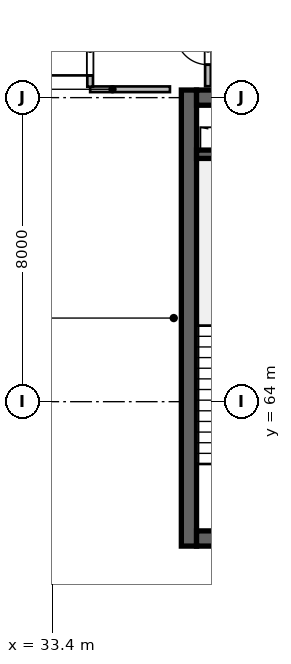
"""IFC4 building model, lengths in metres.
Left out: names, types, materials, properties, quantities, classifications, styles, units other than length and angle.
Written with IfcOpenShell. Run it as: python <this file> out.ifc"""

import sys

from ifc_helpers import new_model, si_unit, direction, frame, frame_2d, origin, place, context, subcontext, project, spatial, rectangle, extrude, source, transform, mapped, element, fill, save


model = new_model("IFC4")
c1 = context("Model", 3, precision=1e-05, world=origin(), true_north=direction((0.0, 1.0)))
c2 = subcontext(c1, "Body", "Model", "MODEL_VIEW")
j1 = project(units=[si_unit("LENGTHUNIT", "METRE"), si_unit("PLANEANGLEUNIT", "RADIAN")], contexts=[c1])
p1 = place(None, origin())
s1 = spatial("IfcSite", under=j1, at=p1, CompositionType="ELEMENT")
p2 = place(p1, origin())
s2 = spatial("IfcBuilding", under=s1, at=p2, CompositionType="ELEMENT")
p3 = place(p2, frame((0.0, 0.0, 303.0)))
s3 = spatial("IfcBuildingStorey", under=s2, at=p3, CompositionType="ELEMENT", Elevation=303.0)
m1 = source(origin(), c2, "Body", "SweptSolid", [
    extrude(rectangle(XDim=12.0, YDim=0.4, at=frame_2d((6.0, 0.0))), origin(), (0.0, 0.0, 1.0), 4.8),
])
p4 = place(p3, frame((37.0, 60.2, 0.0), z_axis=(0.0, 0.0, 1.0), x_axis=(0.0, 1.0, 0.0)))
e1 = element("IfcWall", 1, at=p4, inside=s3, PredefinedType="SHEAR", context=c2, shape_type="MappedRepresentation", body=[
    mapped(m1, transform((0.0, 0.0, 0.0), scale=1.0)),
])
m2 = source(origin(), c2, "Body", "SweptSolid", [
    extrude(rectangle(XDim=21.6, YDim=0.4, at=frame_2d((10.8, 0.0))), origin(), (0.0, 0.0, 1.0), 4.8),
])
p5 = place(p3, frame((37.2, 60.4, 0.0), z_axis=(0.0, 0.0, 1.0), x_axis=(1.0, 0.0, 0.0)))
e2 = element("IfcWall", 2, at=p5, inside=s3, PredefinedType="SHEAR", context=c2, shape_type="MappedRepresentation", body=[
    mapped(m2, transform((0.0, 0.0, 0.0), scale=1.0)),
])
p6 = place(p5, frame((1.1, 0.0, 0.0)))
e3 = element("IfcOpeningElement", 3, at=p6, cuts=e2, PredefinedType="OPENING", context=c2, shape_type="SweptSolid", body=[
    extrude(rectangle(XDim=1.15, YDim=2.15, at=frame_2d((0.575, 1.075))), frame((0.0, 0.21, 0.0), z_axis=(0.0, -1.0, 0.0), x_axis=(1.0, 0.0, 0.0)), (0.0, 0.0, 1.0), 0.42),
])
p7 = place(p5, frame((19.5, 0.0, 0.0)))
e4 = element("IfcOpeningElement", 4, at=p7, cuts=e2, PredefinedType="OPENING", context=c2, shape_type="SweptSolid", body=[
    extrude(rectangle(XDim=0.9, YDim=2.1, at=frame_2d((0.45, 1.05))), frame((0.0, 0.21, 0.0), z_axis=(0.0, -1.0, 0.0), x_axis=(1.0, 0.0, 0.0)), (0.0, 0.0, 1.0), 0.42),
])
p8 = place(p5, frame((12.02, 0.0, 0.0)))
e5 = element("IfcOpeningElement", 5, at=p8, cuts=e2, PredefinedType="OPENING", context=c2, shape_type="SweptSolid", body=[
    extrude(rectangle(XDim=1.6, YDim=2.15, at=frame_2d((0.8, 1.075))), frame((0.0, 0.21, 0.0), z_axis=(0.0, -1.0, 0.0), x_axis=(1.0, 0.0, 0.0)), (0.0, 0.0, 1.0), 0.42),
])
p9 = place(p3, frame((37.2, 72.0, 0.0), z_axis=(0.0, 0.0, 1.0), x_axis=(1.0, 0.0, 0.0)))
e6 = element("IfcWall", 6, at=p9, inside=s3, PredefinedType="SHEAR", context=c2, shape_type="MappedRepresentation", body=[
    mapped(m2, transform((0.0, 0.0, 0.0), scale=1.0)),
])
p10 = place(p9, frame((1.2, 0.0, 0.0)))
e7 = element("IfcOpeningElement", 7, at=p10, cuts=e6, PredefinedType="OPENING", context=c2, shape_type="SweptSolid", body=[
    extrude(rectangle(XDim=0.9, YDim=2.1, at=frame_2d((0.45, 1.05))), frame((0.0, 0.21, 0.0), z_axis=(0.0, -1.0, 0.0), x_axis=(1.0, 0.0, 0.0)), (0.0, 0.0, 1.0), 0.42),
])
p11 = place(p9, frame((14.7, 0.0, 0.0)))
e8 = element("IfcOpeningElement", 8, at=p11, cuts=e6, PredefinedType="OPENING", context=c2, shape_type="SweptSolid", body=[
    extrude(rectangle(XDim=1.2, YDim=2.15, at=frame_2d((0.6, 1.075))), frame((0.0, 0.21, 0.0), z_axis=(0.0, -1.0, 0.0), x_axis=(1.0, 0.0, 0.0)), (0.0, 0.0, 1.0), 0.42),
])
p12 = place(p9, frame((4.15, 0.0, 0.0)))
e9 = element("IfcOpeningElement", 9, at=p12, cuts=e6, PredefinedType="OPENING", context=c2, shape_type="SweptSolid", body=[
    extrude(rectangle(XDim=1.3, YDim=2.15, at=frame_2d((0.65, 1.075))), frame((0.0, 0.21, 0.0), z_axis=(0.0, -1.0, 0.0), x_axis=(1.0, 0.0, 0.0)), (0.0, 0.0, 1.0), 0.42),
])
p13 = place(p9, frame((6.76, 0.0, 0.0)))
e10 = element("IfcOpeningElement", 10, at=p13, cuts=e6, PredefinedType="OPENING", context=c2, shape_type="SweptSolid", body=[
    extrude(rectangle(XDim=0.85, YDim=2.1, at=frame_2d((0.425, 1.05))), frame((0.0, 0.21, 0.0), z_axis=(0.0, -1.0, 0.0), x_axis=(1.0, 0.0, 0.0)), (0.0, 0.0, 1.0), 0.42),
])
p14 = place(p9, frame((8.76, 0.0, 0.0)))
e11 = element("IfcOpeningElement", 11, at=p14, cuts=e6, PredefinedType="OPENING", context=c2, shape_type="SweptSolid", body=[
    extrude(rectangle(XDim=0.85, YDim=2.1, at=frame_2d((0.425, 1.05))), frame((0.0, 0.21, 0.0), z_axis=(0.0, -1.0, 0.0), x_axis=(1.0, 0.0, 0.0)), (0.0, 0.0, 1.0), 0.42),
])
p15 = place(p9, frame((10.725, 0.0, 0.0)))
e12 = element("IfcOpeningElement", 12, at=p15, cuts=e6, PredefinedType="OPENING", context=c2, shape_type="SweptSolid", body=[
    extrude(rectangle(XDim=0.85, YDim=2.1, at=frame_2d((0.425, 1.05))), frame((0.0, 0.21, 0.0), z_axis=(0.0, -1.0, 0.0), x_axis=(1.0, 0.0, 0.0)), (0.0, 0.0, 1.0), 0.42),
])
m3 = source(origin(), c2, "Body", "SweptSolid", [
    extrude(rectangle(XDim=3.27, YDim=0.22, at=frame_2d((1.635, 0.0))), origin(), (0.0, 0.0, 1.0), 4.8),
])
p16 = place(p3, frame((37.2, 70.51, 0.0), z_axis=(0.0, 0.0, 1.0), x_axis=(1.0, 0.0, 0.0)))
e13 = element("IfcWall", 13, at=p16, inside=s3, PredefinedType="SHEAR", context=c2, shape_type="MappedRepresentation", body=[
    mapped(m3, transform((0.0, 0.0, 0.0), scale=1.0)),
])
m4 = source(origin(), c2, "Body", "SweptSolid", [
    extrude(rectangle(XDim=2.1, YDim=0.15, at=frame_2d((1.05, 0.0))), origin(), (0.0, 0.0, 1.0), 4.54),
])
p17 = place(p3, frame((34.4, 72.22, 0.0), z_axis=(0.0, 0.0, 1.0), x_axis=(1.0, 0.0, 0.0)))
e14 = element("IfcWall", 14, at=p17, inside=s3, PredefinedType="PARTITIONING", context=c2, shape_type="MappedRepresentation", body=[
    mapped(m4, transform((0.0, 0.0, 0.0), scale=1.0)),
])
m5 = source(origin(), c2, "Body", "SweptSolid", [
    extrude(rectangle(XDim=1.995, YDim=0.15, at=frame_2d((0.998, 0.0))), origin(), (0.0, 0.0, 1.0), 4.54),
])
p18 = place(p3, frame((34.4, 72.288, 0.0), z_axis=(0.0, 0.0, 1.0), x_axis=(0.0, 1.0, 0.0)))
e15 = element("IfcWall", 15, at=p18, inside=s3, PredefinedType="PARTITIONING", context=c2, shape_type="MappedRepresentation", body=[
    mapped(m5, transform((0.0, 0.0, 0.0), scale=1.0)),
])
p19 = place(p18, frame((0.298, 0.0, 0.0)))
e16 = element("IfcOpeningElement", 16, at=p19, cuts=e15, PredefinedType="OPENING", context=c2, shape_type="SweptSolid", body=[
    extrude(rectangle(XDim=1.4, YDim=2.15, at=frame_2d((0.7, 1.075))), frame((0.0, 0.085, 0.0), z_axis=(0.0, -1.0, 0.0), x_axis=(1.0, 0.0, 0.0)), (0.0, 0.0, 1.0), 0.17),
])
m6 = source(origin(), c2, "Body", "SweptSolid", [
    extrude(rectangle(XDim=1.982, YDim=0.15, at=frame_2d((0.991, 0.0))), origin(), (0.0, 0.0, 1.0), 4.54),
])
p20 = place(p3, frame((37.5, 72.3, 0.0), z_axis=(0.0, 0.0, 1.0), x_axis=(0.0, 1.0, 0.0)))
e17 = element("IfcWall", 17, at=p20, inside=s3, PredefinedType="PARTITIONING", context=c2, shape_type="MappedRepresentation", body=[
    mapped(m6, transform((0.0, 0.0, 0.0), scale=1.0)),
])
p21 = place(p20, frame((0.566, 0.0, 0.0)))
e18 = element("IfcOpeningElement", 18, at=p21, cuts=e17, PredefinedType="OPENING", context=c2, shape_type="SweptSolid", body=[
    extrude(rectangle(XDim=0.85, YDim=2.1, at=frame_2d((0.425, 1.05))), frame((0.0, 0.085, 0.0), z_axis=(0.0, -1.0, 0.0), x_axis=(1.0, 0.0, 0.0)), (0.0, 0.0, 1.0), 0.17),
])
m7 = source(origin(), c2, "Body", "SweptSolid", [
    extrude(rectangle(XDim=0.85, YDim=2.1, at=frame_2d((0.425, 1.05))), frame((0.0, 0.025, 0.0), z_axis=(0.0, -1.0, 0.0), x_axis=(1.0, 0.0, 0.0)), (0.0, 0.0, 1.0), 0.05),
])
p22 = place(p21, origin())
e19 = element("IfcDoor", 19, at=p22, inside=s3, OperationType="SINGLE_SWING_RIGHT", PredefinedType="DOOR", context=c2, shape_type="MappedRepresentation", body=[
    mapped(m7, transform((0.0, 0.0, 0.0), scale=1.0)),
])
fill(e18, e19)
m8 = source(origin(), c2, "Body", "SweptSolid", [
    extrude(rectangle(XDim=1.4, YDim=2.15, at=frame_2d((0.7, 1.075))), frame((0.0, 0.025, 0.0), z_axis=(0.0, -1.0, 0.0), x_axis=(1.0, 0.0, 0.0)), (0.0, 0.0, 1.0), 0.05),
])
p23 = place(p19, origin())
e20 = element("IfcDoor", 20, at=p23, inside=s3, OperationType="SINGLE_SWING_LEFT", PredefinedType="DOOR", context=c2, shape_type="MappedRepresentation", body=[
    mapped(m8, transform((0.0, 0.0, 0.0), scale=1.0)),
])
fill(e16, e20)
save(model, sys.argv[1])
